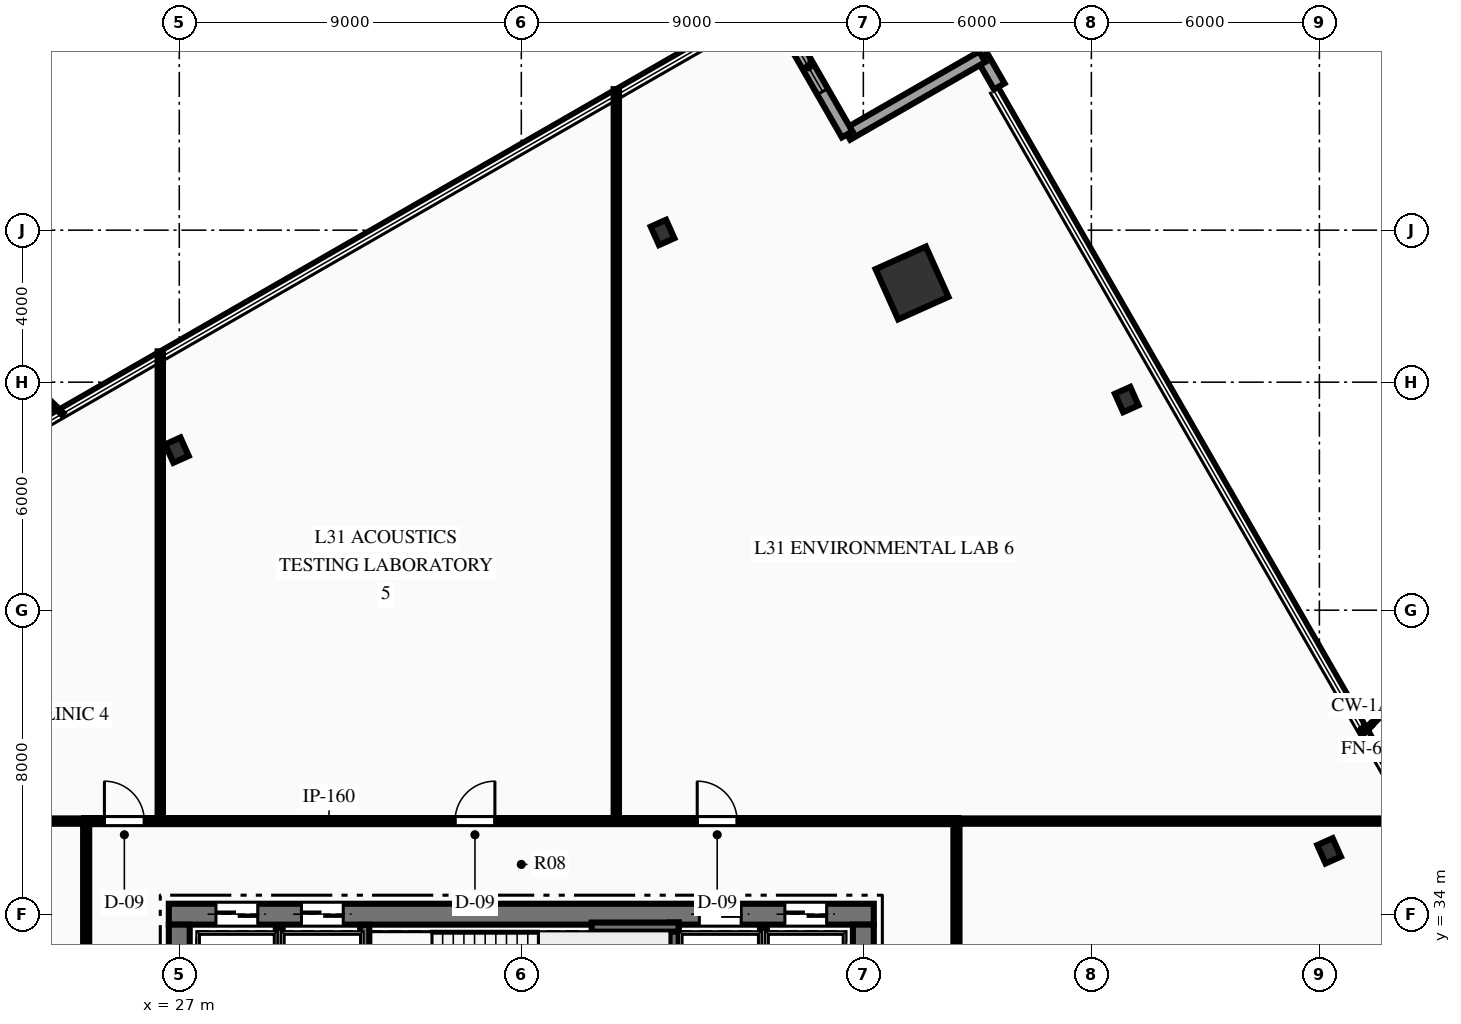
"""IFC4 building model, lengths in metres.
Left out: names, types, materials, properties, quantities, classifications, styles, units other than length and angle.
Written with IfcOpenShell. Run it as: python <this file> out.ifc"""

import sys

from ifc_helpers import new_model, si_unit, direction, frame, frame_2d, origin, origin_2d, place, context, subcontext, project, spatial, rectangle, hollow_rectangle, i_section, extrude, element, fill, save


model = new_model("IFC4")
c1 = context("Model", 3, precision=1e-05, world=origin(), true_north=direction((0.0, 1.0)))
c2 = subcontext(c1, "Body", "Model", "MODEL_VIEW")
j1 = project(units=[si_unit("LENGTHUNIT", "METRE"), si_unit("PLANEANGLEUNIT", "RADIAN")], contexts=[c1])
p1 = place(None, origin())
s1 = spatial("IfcSite", under=j1, at=p1, CompositionType="ELEMENT")
p2 = place(p1, origin())
s2 = spatial("IfcBuilding", under=s1, at=p2, CompositionType="ELEMENT")
p3 = place(p2, frame((0.0, 0.0, 127.95)))
s3 = spatial("IfcBuildingStorey", under=s2, at=p3, CompositionType="ELEMENT", Elevation=127.95)
p4 = place(p3, frame((26.725, 34.0, 0.0), z_axis=(0.0, 0.0, 1.0), x_axis=(1.0, 0.0, 0.0)))
e1 = element("IfcWall", 1, at=p4, inside=s3, PredefinedType="SHEAR", context=c2, shape_type="SweptSolid", body=[
    extrude(rectangle(XDim=18.55, YDim=0.55, at=frame_2d((9.275, 0.0))), origin(), (0.0, 0.0, 1.0), 3.75),
])
p5 = place(p4, frame((1.24, 0.0, 0.0)))
e2 = element("IfcOpeningElement", 2, at=p5, cuts=e1, PredefinedType="OPENING", context=c2, shape_type="SweptSolid", body=[
    extrude(rectangle(XDim=1.1, YDim=2.15, at=frame_2d((0.55, 1.075))), frame((0.0, 0.285, 0.0), z_axis=(0.0, -1.0, 0.0), x_axis=(1.0, 0.0, 0.0)), (0.0, 0.0, 1.0), 0.57),
])
p6 = place(p4, frame((3.49, 0.0, 0.0)))
e3 = element("IfcOpeningElement", 3, at=p6, cuts=e1, PredefinedType="OPENING", context=c2, shape_type="SweptSolid", body=[
    extrude(rectangle(XDim=1.1, YDim=2.15, at=frame_2d((0.55, 1.075))), frame((0.0, 0.285, 0.0), z_axis=(0.0, -1.0, 0.0), x_axis=(1.0, 0.0, 0.0)), (0.0, 0.0, 1.0), 0.57),
])
p7 = place(p4, frame((13.96, 0.0, 0.0)))
e4 = element("IfcOpeningElement", 4, at=p7, cuts=e1, PredefinedType="OPENING", context=c2, shape_type="SweptSolid", body=[
    extrude(rectangle(XDim=1.1, YDim=2.15, at=frame_2d((0.55, 1.075))), frame((0.0, 0.285, 0.0), z_axis=(0.0, -1.0, 0.0), x_axis=(1.0, 0.0, 0.0)), (0.0, 0.0, 1.0), 0.57),
])
p8 = place(p4, frame((16.21, 0.0, 0.0)))
e5 = element("IfcOpeningElement", 5, at=p8, cuts=e1, PredefinedType="OPENING", context=c2, shape_type="SweptSolid", body=[
    extrude(rectangle(XDim=1.1, YDim=2.15, at=frame_2d((0.55, 1.075))), frame((0.0, 0.285, 0.0), z_axis=(0.0, -1.0, 0.0), x_axis=(1.0, 0.0, 0.0)), (0.0, 0.0, 1.0), 0.57),
])
p9 = place(p3, frame((27.0, 18.275, 0.0), z_axis=(0.0, 0.0, 1.0), x_axis=(0.0, 1.0, 0.0)))
e6 = element("IfcWall", 6, at=p9, inside=s3, PredefinedType="SHEAR", context=c2, shape_type="SweptSolid", body=[
    extrude(rectangle(XDim=15.45, YDim=0.55, at=frame_2d((7.725, 0.0))), origin(), (0.0, 0.0, 1.0), 3.75),
])
p10 = place(p9, frame((9.965, 0.0, 0.0)))
e7 = element("IfcOpeningElement", 7, at=p10, cuts=e6, PredefinedType="OPENING", context=c2, shape_type="SweptSolid", body=[
    extrude(rectangle(XDim=1.4, YDim=2.2, at=frame_2d((0.7, 1.1))), frame((0.0, 0.285, 0.0), z_axis=(0.0, -1.0, 0.0), x_axis=(1.0, 0.0, 0.0)), (0.0, 0.0, 1.0), 0.57),
])
p11 = place(p3, frame((45.0, 18.275, 0.0), z_axis=(0.0, 0.0, 1.0), x_axis=(0.0, 1.0, 0.0)))
e8 = element("IfcWall", 8, at=p11, inside=s3, PredefinedType="SHEAR", context=c2, shape_type="SweptSolid", body=[
    extrude(rectangle(XDim=15.45, YDim=0.55, at=frame_2d((7.725, 0.0))), origin(), (0.0, 0.0, 1.0), 3.75),
])
p12 = place(p11, frame((9.965, 0.0, 0.0)))
e9 = element("IfcOpeningElement", 9, at=p12, cuts=e8, PredefinedType="OPENING", context=c2, shape_type="SweptSolid", body=[
    extrude(rectangle(XDim=1.4, YDim=2.2, at=frame_2d((0.7, 1.1))), frame((0.0, 0.285, 0.0), z_axis=(0.0, -1.0, 0.0), x_axis=(1.0, 0.0, 0.0)), (0.0, 0.0, 1.0), 0.57),
])
p13 = place(p3, frame((31.88, 29.93, 0.0), z_axis=(0.0, 0.0, 1.0), x_axis=(0.0, 1.0, 0.0)))
e10 = element("IfcWall", 10, at=p13, inside=s3, PredefinedType="SHEAR", context=c2, shape_type="SweptSolid", body=[
    extrude(rectangle(XDim=3.79, YDim=0.24, at=frame_2d((1.895, 0.0))), origin(), (0.0, 0.0, 1.0), 3.75),
])
p14 = place(p3, frame((40.02, 29.93, 0.0), z_axis=(0.0, 0.0, 1.0), x_axis=(0.0, 1.0, 0.0)))
e11 = element("IfcWall", 11, at=p14, inside=s3, PredefinedType="SHEAR", context=c2, shape_type="SweptSolid", body=[
    extrude(rectangle(XDim=3.85, YDim=0.24, at=frame_2d((1.925, 0.0))), origin(), (0.0, 0.0, 1.0), 3.75),
])
p15 = place(p3, frame((37.85, 33.66, 0.0), z_axis=(0.0, 0.0, 1.0), x_axis=(1.0, 0.0, 0.0)))
e12 = element("IfcWall", 12, at=p15, inside=s3, PredefinedType="SHEAR", context=c2, shape_type="SweptSolid", body=[
    extrude(rectangle(XDim=2.29, YDim=0.24, at=frame_2d((1.145, 0.0))), origin(), (0.0, 0.0, 1.0), 3.75),
])
p16 = place(p3, frame((46.281, 50.61, 0.0), z_axis=(0.0, 0.0, 1.0), x_axis=(0.912477494148, 0.409126902895, 0.0)))
e13 = element("IfcColumn", 13, at=p16, inside=s3, PredefinedType="COLUMN", context=c2, shape_type="SweptSolid", body=[
    extrude(hollow_rectangle(XDim=1.45, YDim=1.45, WallThickness=0.07, at=origin_2d()), origin(), (0.0, 0.0, 1.0), 3.75),
])
for number, where, z_axis, x_axis in (
    (14, (57.255, 35.667, 0.0), (0.0, 0.0, 1.0), (0.912, 0.409, 0.0)),
    (15, (51.93, 47.543, 0.0), (0.0, 0.0, 1.0), (0.912, 0.409, 0.0)),
    (16, (39.716, 51.941, 0.0), (0.0, 0.0, 1.0), (0.912, 0.409, 0.0)),
    (17, (26.938, 46.211, 0.0), (0.0, 0.0, 1.0), (0.912, 0.409, 0.0)),
):
    element("IfcColumn", number, at=place(p3, frame(where, z_axis=z_axis, x_axis=x_axis)), inside=s3, PredefinedType="COLUMN", context=c2, shape_type="SweptSolid", body=[
        extrude(i_section(OverallWidth=0.442, OverallDepth=0.531, WebThickness=0.066, FlangeThickness=0.106, at=origin_2d()), origin(), (0.0, 0.0, 1.0), 3.75),
    ])
p17 = place(p3, frame((48.128, 56.564, 0.0), z_axis=(0.0, 0.0, 1.0), x_axis=(0.498532275396, -0.866871138283, 0.0)))
e18 = element("IfcWall", 18, at=p17, inside=s3, PredefinedType="STANDARD", context=c2, shape_type="SweptSolid", body=[
    extrude(rectangle(XDim=0.9, YDim=0.32, at=frame_2d((0.45, 0.0))), origin(), (0.0, 0.0, 1.0), 3.4),
])
p18 = place(p3, frame((44.574, 54.52, 0.0), z_axis=(0.0, 0.0, 1.0), x_axis=(0.866876710122, 0.498522586698, 0.0)))
e19 = element("IfcWall", 19, at=p18, inside=s3, PredefinedType="STANDARD", context=c2, shape_type="SweptSolid", body=[
    extrude(rectangle(XDim=4.1, YDim=0.32, at=frame_2d((2.05, 0.0))), origin(), (0.0, 0.0, 1.0), 3.4),
])
p19 = place(p3, frame((42.531, 58.075, 0.0), z_axis=(0.0, 0.0, 1.0), x_axis=(0.498452105503, -0.866917238564, 0.0)))
e20 = element("IfcWall", 20, at=p19, inside=s3, PredefinedType="STANDARD", context=c2, shape_type="SweptSolid", body=[
    extrude(rectangle(XDim=4.1, YDim=0.32, at=frame_2d((2.05, 0.0))), origin(), (0.0, 0.0, 1.0), 3.4),
])
p20 = place(p19, frame((1.3, 0.0, 0.85)))
e21 = element("IfcOpeningElement", 21, at=p20, cuts=e20, PredefinedType="OPENING", context=c2, shape_type="SweptSolid", body=[
    extrude(rectangle(XDim=1.5, YDim=2.1, at=frame_2d((0.75, 1.05))), frame((0.0, 0.17, 0.0), z_axis=(0.0, -1.0, 0.0), x_axis=(1.0, 0.0, 0.0)), (0.0, 0.0, 1.0), 0.34),
])
for number, where, z_axis, x_axis in (
    (22, (29.63, 29.9, 0.0), (0.0, 0.0, 1.0), (0.0, 1.0, 0.0)),
    (23, (42.37, 29.9, 0.0), (0.0, 0.0, 1.0), (0.0, 1.0, 0.0)),
):
    element("IfcWall", number, at=place(p3, frame(where, z_axis=z_axis, x_axis=x_axis)), inside=s3, PredefinedType="PARTITIONING", context=c2, shape_type="SweptSolid", body=[
        extrude(rectangle(XDim=3.75, YDim=0.18, at=frame_2d((1.875, 0.0))), origin(), (0.0, 0.0, 1.0), 3.4),
    ])
p21 = place(p3, frame((24.5, 36.45, 0.0), z_axis=(0.0, 0.0, 1.0), x_axis=(1.0, 0.0, 0.0)))
e24 = element("IfcWall", 24, at=p21, inside=s3, PredefinedType="PARTITIONING", context=c2, shape_type="SweptSolid", body=[
    extrude(rectangle(XDim=23.0, YDim=0.16, at=frame_2d((11.5, 0.0))), origin(), (0.0, 0.0, 1.0), 3.4),
])
p22 = place(p21, frame((0.53, 0.0, 0.0)))
e25 = element("IfcOpeningElement", 25, at=p22, cuts=e24, PredefinedType="OPENING", context=c2, shape_type="SweptSolid", body=[
    extrude(rectangle(XDim=1.05, YDim=2.15, at=frame_2d((0.525, 1.075))), frame((0.0, 0.09, 0.0), z_axis=(0.0, -1.0, 0.0), x_axis=(1.0, 0.0, 0.0)), (0.0, 0.0, 1.0), 0.18),
])
p23 = place(p21, frame((9.755, 0.0, 0.0)))
e26 = element("IfcOpeningElement", 26, at=p23, cuts=e24, PredefinedType="OPENING", context=c2, shape_type="SweptSolid", body=[
    extrude(rectangle(XDim=1.05, YDim=2.15, at=frame_2d((0.525, 1.075))), frame((0.0, 0.09, 0.0), z_axis=(0.0, -1.0, 0.0), x_axis=(1.0, 0.0, 0.0)), (0.0, 0.0, 1.0), 0.18),
])
p24 = place(p21, frame((16.129, 0.0, 0.0)))
e27 = element("IfcOpeningElement", 27, at=p24, cuts=e24, PredefinedType="OPENING", context=c2, shape_type="SweptSolid", body=[
    extrude(rectangle(XDim=1.05, YDim=2.15, at=frame_2d((0.525, 1.075))), frame((0.0, 0.09, 0.0), z_axis=(0.0, -1.0, 0.0), x_axis=(1.0, 0.0, 0.0)), (0.0, 0.0, 1.0), 0.18),
])
p25 = place(p3, frame((24.55, 15.55, 0.0), z_axis=(0.0, 0.0, 1.0), x_axis=(0.0, 1.0, 0.0)))
e28 = element("IfcWall", 28, at=p25, inside=s3, PredefinedType="PARTITIONING", context=c2, shape_type="SweptSolid", body=[
    extrude(rectangle(XDim=20.9, YDim=0.16, at=frame_2d((10.45, 0.0))), origin(), (0.0, 0.0, 1.0), 3.4),
])
p26 = place(p25, frame((5.075, 0.0, 0.0)))
e29 = element("IfcOpeningElement", 29, at=p26, cuts=e28, PredefinedType="OPENING", context=c2, shape_type="SweptSolid", body=[
    extrude(rectangle(XDim=0.95, YDim=2.15, at=frame_2d((0.475, 1.075))), frame((0.0, 0.09, 0.0), z_axis=(0.0, -1.0, 0.0), x_axis=(1.0, 0.0, 0.0)), (0.0, 0.0, 1.0), 0.18),
])
p27 = place(p25, frame((12.524, 0.0, 0.0)))
e30 = element("IfcOpeningElement", 30, at=p27, cuts=e28, PredefinedType="OPENING", context=c2, shape_type="SweptSolid", body=[
    extrude(rectangle(XDim=1.05, YDim=2.15, at=frame_2d((0.525, 1.075))), frame((0.0, 0.09, 0.0), z_axis=(0.0, -1.0, 0.0), x_axis=(1.0, 0.0, 0.0)), (0.0, 0.0, 1.0), 0.18),
])
p28 = place(p3, frame((47.45, 15.55, 0.0), z_axis=(0.0, 0.0, 1.0), x_axis=(0.0, 1.0, 0.0)))
e31 = element("IfcWall", 31, at=p28, inside=s3, PredefinedType="PARTITIONING", context=c2, shape_type="SweptSolid", body=[
    extrude(rectangle(XDim=20.9, YDim=0.16, at=frame_2d((10.45, 0.0))), origin(), (0.0, 0.0, 1.0), 3.4),
])
p29 = place(p28, frame((4.087, 0.0, 0.0)))
e32 = element("IfcOpeningElement", 32, at=p29, cuts=e31, PredefinedType="OPENING", context=c2, shape_type="SweptSolid", body=[
    extrude(rectangle(XDim=1.05, YDim=2.15, at=frame_2d((0.525, 1.075))), frame((0.0, 0.09, 0.0), z_axis=(0.0, -1.0, 0.0), x_axis=(1.0, 0.0, 0.0)), (0.0, 0.0, 1.0), 0.18),
])
p30 = place(p28, frame((7.885, 0.0, 0.0)))
e33 = element("IfcOpeningElement", 33, at=p30, cuts=e31, PredefinedType="OPENING", context=c2, shape_type="SweptSolid", body=[
    extrude(rectangle(XDim=1.05, YDim=2.15, at=frame_2d((0.525, 1.075))), frame((0.0, 0.09, 0.0), z_axis=(0.0, -1.0, 0.0), x_axis=(1.0, 0.0, 0.0)), (0.0, 0.0, 1.0), 0.18),
])
p31 = place(p28, frame((14.743, 0.0, 0.0)))
e34 = element("IfcOpeningElement", 34, at=p31, cuts=e31, PredefinedType="OPENING", context=c2, shape_type="SweptSolid", body=[
    extrude(rectangle(XDim=1.05, YDim=2.15, at=frame_2d((0.525, 1.075))), frame((0.0, 0.09, 0.0), z_axis=(0.0, -1.0, 0.0), x_axis=(1.0, 0.0, 0.0)), (0.0, 0.0, 1.0), 0.18),
])
p32 = place(p3, frame((5.063, 36.45, 0.0), z_axis=(0.0, 0.0, 1.0), x_axis=(1.0, 0.0, 0.0)))
e35 = element("IfcWall", 35, at=p32, inside=s3, PredefinedType="PARTITIONING", context=c2, shape_type="SweptSolid", body=[
    extrude(rectangle(XDim=19.487, YDim=0.14, at=frame_2d((9.744, 0.0))), origin(), (0.0, 0.0, 1.0), 3.4),
])
p33 = place(p3, frame((47.45, 36.45, 0.0), z_axis=(0.0, 0.0, 1.0), x_axis=(1.0, 0.0, 0.0)))
e36 = element("IfcWall", 36, at=p33, inside=s3, PredefinedType="PARTITIONING", context=c2, shape_type="SweptSolid", body=[
    extrude(rectangle(XDim=12.198, YDim=0.14, at=frame_2d((6.099, 0.0))), origin(), (0.0, 0.0, 1.0), 3.4),
])
p34 = place(p3, frame((26.5, 36.45, 0.0), z_axis=(0.0, 0.0, 1.0), x_axis=(0.0, 1.0, 0.0)))
e37 = element("IfcWall", 37, at=p34, inside=s3, PredefinedType="PARTITIONING", context=c2, shape_type="SweptSolid", body=[
    extrude(rectangle(XDim=12.361, YDim=0.14, at=frame_2d((6.18, 0.0))), origin(), (0.0, 0.0, 1.0), 3.4),
])
p35 = place(p3, frame((38.5, 36.45, 0.0), z_axis=(0.0, 0.0, 1.0), x_axis=(0.0, 1.0, 0.0)))
e38 = element("IfcWall", 38, at=p35, inside=s3, PredefinedType="PARTITIONING", context=c2, shape_type="SweptSolid", body=[
    extrude(rectangle(XDim=19.261, YDim=0.14, at=frame_2d((9.63, 0.0))), origin(), (0.0, 0.0, 1.0), 3.4),
])
p36 = place(p20, origin())
e39 = element("IfcWindow", 39, at=p36, inside=s3, PartitioningType="SINGLE_PANEL", PredefinedType="WINDOW", context=c2, shape_type="SweptSolid", body=[
    extrude(rectangle(XDim=1.5, YDim=2.1, at=frame_2d((0.75, 1.05))), frame((0.0, 0.03, 0.0), z_axis=(0.0, -1.0, 0.0), x_axis=(1.0, 0.0, 0.0)), (0.0, 0.0, 1.0), 0.06),
])
fill(e21, e39)
p37 = place(p22, origin())
e40 = element("IfcDoor", 40, at=p37, inside=s3, OperationType="SINGLE_SWING_LEFT", PredefinedType="DOOR", context=c2, shape_type="SweptSolid", body=[
    extrude(rectangle(XDim=1.05, YDim=2.15, at=frame_2d((0.525, 1.075))), frame((0.0, 0.025, 0.0), z_axis=(0.0, -1.0, 0.0), x_axis=(1.0, 0.0, 0.0)), (0.0, 0.0, 1.0), 0.05),
])
fill(e25, e40)
p38 = place(p23, origin())
e41 = element("IfcDoor", 41, at=p38, inside=s3, OperationType="SINGLE_SWING_RIGHT", PredefinedType="DOOR", context=c2, shape_type="SweptSolid", body=[
    extrude(rectangle(XDim=1.05, YDim=2.15, at=frame_2d((0.525, 1.075))), frame((0.0, 0.025, 0.0), z_axis=(0.0, -1.0, 0.0), x_axis=(1.0, 0.0, 0.0)), (0.0, 0.0, 1.0), 0.05),
])
fill(e26, e41)
p39 = place(p24, origin())
e42 = element("IfcDoor", 42, at=p39, inside=s3, OperationType="SINGLE_SWING_LEFT", PredefinedType="DOOR", context=c2, shape_type="SweptSolid", body=[
    extrude(rectangle(XDim=1.05, YDim=2.15, at=frame_2d((0.525, 1.075))), frame((0.0, 0.025, 0.0), z_axis=(0.0, -1.0, 0.0), x_axis=(1.0, 0.0, 0.0)), (0.0, 0.0, 1.0), 0.05),
])
fill(e27, e42)
p40 = place(p5, origin())
e43 = element("IfcDoor", 43, at=p40, inside=s3, OperationType="SLIDING_TO_LEFT", PredefinedType="DOOR", context=c2, shape_type="SweptSolid", body=[
    extrude(rectangle(XDim=1.1, YDim=2.15, at=frame_2d((0.55, 1.075))), frame((0.0, 0.025, 0.0), z_axis=(0.0, -1.0, 0.0), x_axis=(1.0, 0.0, 0.0)), (0.0, 0.0, 1.0), 0.05),
])
fill(e2, e43)
p41 = place(p6, origin())
e44 = element("IfcDoor", 44, at=p41, inside=s3, OperationType="SLIDING_TO_LEFT", PredefinedType="DOOR", context=c2, shape_type="SweptSolid", body=[
    extrude(rectangle(XDim=1.1, YDim=2.15, at=frame_2d((0.55, 1.075))), frame((0.0, 0.025, 0.0), z_axis=(0.0, -1.0, 0.0), x_axis=(1.0, 0.0, 0.0)), (0.0, 0.0, 1.0), 0.05),
])
fill(e3, e44)
p42 = place(p7, origin())
e45 = element("IfcDoor", 45, at=p42, inside=s3, OperationType="SLIDING_TO_LEFT", PredefinedType="DOOR", context=c2, shape_type="SweptSolid", body=[
    extrude(rectangle(XDim=1.1, YDim=2.15, at=frame_2d((0.55, 1.075))), frame((0.0, 0.025, 0.0), z_axis=(0.0, -1.0, 0.0), x_axis=(1.0, 0.0, 0.0)), (0.0, 0.0, 1.0), 0.05),
])
fill(e4, e45)
p43 = place(p8, origin())
e46 = element("IfcDoor", 46, at=p43, inside=s3, OperationType="SLIDING_TO_LEFT", PredefinedType="DOOR", context=c2, shape_type="SweptSolid", body=[
    extrude(rectangle(XDim=1.1, YDim=2.15, at=frame_2d((0.55, 1.075))), frame((0.0, 0.025, 0.0), z_axis=(0.0, -1.0, 0.0), x_axis=(1.0, 0.0, 0.0)), (0.0, 0.0, 1.0), 0.05),
])
fill(e5, e46)
save(model, sys.argv[1])
